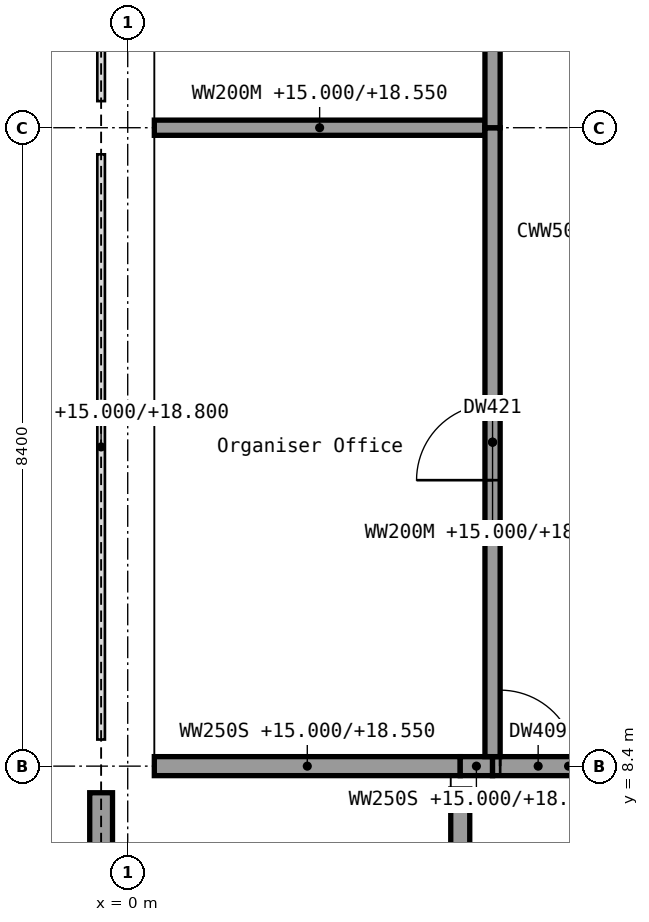
"""IFC4 building model, lengths in metres.
Left out: names, types, materials, properties, quantities, classifications, styles, units other than length and angle.
Written with IfcOpenShell. Run it as: python <this file> out.ifc"""

import sys

from ifc_helpers import new_model, si_unit, direction, frame, frame_2d, origin, origin_2d, place, context, subcontext, project, spatial, rectangle, extrude, element, fill, save


model = new_model("IFC4")
c1 = context("Model", 3, precision=1e-05, world=origin(), true_north=direction((0.0, 1.0)))
c2 = subcontext(c1, "Body", "Model", "MODEL_VIEW")
j1 = project(units=[si_unit("LENGTHUNIT", "METRE"), si_unit("PLANEANGLEUNIT", "RADIAN")], contexts=[c1])
p1 = place(None, origin())
s1 = spatial("IfcSite", under=j1, at=p1, CompositionType="ELEMENT")
p2 = place(p1, origin())
s2 = spatial("IfcBuilding", under=s1, at=p2, CompositionType="ELEMENT")
p3 = place(p2, frame((0.0, 0.0, 15.0)))
s3 = spatial("IfcBuildingStorey", under=s2, at=p3, CompositionType="ELEMENT", Elevation=15.0)
for number, where, z_axis, x_axis in (
    (1, (0.0, 8.4, 0.0), (0.0, 0.0, 1.0), (1.0, 0.0, 0.0)),
    (2, (0.0, 16.8, 0.0), (0.0, 0.0, 1.0), (1.0, 0.0, 0.0)),
):
    element("IfcColumn", number, at=place(p3, frame(where, z_axis=z_axis, x_axis=x_axis)), inside=s3, PredefinedType="COLUMN", context=c2, shape_type="SweptSolid", body=[
        extrude(rectangle(XDim=0.7, YDim=0.7, at=origin_2d()), origin(), (0.0, 0.0, 1.0), 4.5),
    ])
p4 = place(p3, frame((-0.35, 0.35, 0.0), z_axis=(0.0, 0.0, 1.0), x_axis=(0.0, 1.0, 0.0)))
e3 = element("IfcWall", 3, at=p4, inside=s3, PredefinedType="SOLIDWALL", context=c2, shape_type="SweptSolid", body=[
    extrude(rectangle(XDim=7.7, YDim=0.3, at=frame_2d((3.85, 0.0))), origin(), (0.0, 0.0, 1.0), 3.8),
])
p5 = place(p4, frame((3.25, 0.0, 1.0)))
e4 = element("IfcOpeningElement", 4, at=p5, cuts=e3, PredefinedType="OPENING", context=c2, shape_type="SweptSolid", body=[
    extrude(rectangle(XDim=1.2, YDim=1.5, at=frame_2d((0.6, 0.75))), frame((0.0, 0.15, 0.0), z_axis=(0.0, -1.0, 0.0), x_axis=(1.0, 0.0, 0.0)), (0.0, 0.0, 1.0), 0.3),
])
p6 = place(p3, frame((0.35, 8.4, 0.0), z_axis=(0.0, 0.0, 1.0), x_axis=(1.0, 0.0, 0.0)))
e5 = element("IfcWall", 5, at=p6, inside=s3, PredefinedType="SHEAR", context=c2, shape_type="SweptSolid", body=[
    extrude(rectangle(XDim=4.025, YDim=0.25, at=frame_2d((2.012, 0.0))), origin(), (0.0, 0.0, 1.0), 3.55),
])
p7 = place(p3, frame((4.375, 8.4, 0.0), z_axis=(0.0, 0.0, 1.0), x_axis=(1.0, 0.0, 0.0)))
e6 = element("IfcWall", 6, at=p7, inside=s3, PredefinedType="SHEAR", context=c2, shape_type="SweptSolid", body=[
    extrude(rectangle(XDim=0.425, YDim=0.25, at=frame_2d((0.212, 0.0))), origin(), (0.0, 0.0, 1.0), 3.55),
])
p8 = place(p3, frame((4.8, 8.4, 0.0), z_axis=(0.0, 0.0, 1.0), x_axis=(1.0, 0.0, 0.0)))
e7 = element("IfcWall", 7, at=p8, inside=s3, PredefinedType="SHEAR", context=c2, shape_type="SweptSolid", body=[
    extrude(rectangle(XDim=2.0, YDim=0.25, at=frame_2d((1.0, 0.0))), origin(), (0.0, 0.0, 1.0), 3.55),
])
p9 = place(p8, frame((0.1, 0.0, 0.0)))
e8 = element("IfcOpeningElement", 8, at=p9, cuts=e7, PredefinedType="OPENING", context=c2, shape_type="SweptSolid", body=[
    extrude(rectangle(XDim=1.0, YDim=2.1, at=frame_2d((0.5, 1.05))), frame((0.0, 0.125, 0.0), z_axis=(0.0, -1.0, 0.0), x_axis=(1.0, 0.0, 0.0)), (0.0, 0.0, 1.0), 0.25),
])
p10 = place(p3, frame((0.35, 16.8, 0.0), z_axis=(0.0, 0.0, 1.0), x_axis=(1.0, 0.0, 0.0)))
e9 = element("IfcWall", 9, at=p10, inside=s3, PredefinedType="PARTITIONING", context=c2, shape_type="SweptSolid", body=[
    extrude(rectangle(XDim=4.35, YDim=0.2, at=frame_2d((2.175, 0.0))), origin(), (0.0, 0.0, 1.0), 3.55),
])
p11 = place(p3, frame((4.375, 0.35, 0.0), z_axis=(0.0, 0.0, 1.0), x_axis=(0.0, 1.0, 0.0)))
e10 = element("IfcWall", 10, at=p11, inside=s3, PredefinedType="SHEAR", context=c2, shape_type="SweptSolid", body=[
    extrude(rectangle(XDim=7.75, YDim=0.25, at=frame_2d((3.875, 0.0))), origin(), (0.0, 0.0, 1.0), 4.15),
])
p12 = place(p11, frame((0.1, 0.0, 0.0)))
e11 = element("IfcOpeningElement", 11, at=p12, cuts=e10, PredefinedType="OPENING", context=c2, shape_type="SweptSolid", body=[
    extrude(rectangle(XDim=1.1, YDim=2.1, at=frame_2d((0.55, 1.05))), frame((0.0, 0.125, 0.0), z_axis=(0.0, -1.0, 0.0), x_axis=(1.0, 0.0, 0.0)), (0.0, 0.0, 1.0), 0.25),
])
p13 = place(p3, frame((4.8, 8.525, 0.0), z_axis=(0.0, 0.0, 1.0), x_axis=(0.0, 1.0, 0.0)))
e12 = element("IfcWall", 12, at=p13, inside=s3, PredefinedType="PARTITIONING", context=c2, shape_type="SweptSolid", body=[
    extrude(rectangle(XDim=8.275, YDim=0.2, at=frame_2d((4.138, 0.0))), origin(), (0.0, 0.0, 1.0), 3.55),
])
p14 = place(p13, frame((3.637, 0.0, 0.0)))
e13 = element("IfcOpeningElement", 13, at=p14, cuts=e12, PredefinedType="OPENING", context=c2, shape_type="SweptSolid", body=[
    extrude(rectangle(XDim=1.0, YDim=2.1, at=frame_2d((0.5, 1.05))), frame((0.0, 0.1, 0.0), z_axis=(0.0, -1.0, 0.0), x_axis=(1.0, 0.0, 0.0)), (0.0, 0.0, 1.0), 0.2),
])
p15 = place(p3, frame((4.8, 16.8, 0.0), z_axis=(0.0, 0.0, 1.0), x_axis=(0.0, 1.0, 0.0)))
e14 = element("IfcWall", 14, at=p15, inside=s3, PredefinedType="PARTITIONING", context=c2, shape_type="SweptSolid", body=[
    extrude(rectangle(XDim=8.4, YDim=0.2, at=frame_2d((4.2, 0.0))), origin(), (0.0, 0.0, 1.0), 3.55),
])
p16 = place(p15, frame((3.7, 0.0, 0.0)))
e15 = element("IfcOpeningElement", 15, at=p16, cuts=e14, PredefinedType="OPENING", context=c2, shape_type="SweptSolid", body=[
    extrude(rectangle(XDim=1.0, YDim=2.1, at=frame_2d((0.5, 1.05))), frame((0.0, 0.1, 0.0), z_axis=(0.0, -1.0, 0.0), x_axis=(1.0, 0.0, 0.0)), (0.0, 0.0, 1.0), 0.2),
])
p17 = place(p9, origin())
e16 = element("IfcDoor", 16, at=p17, inside=s3, OperationType="SINGLE_SWING_LEFT", PredefinedType="DOOR", context=c2, shape_type="SweptSolid", body=[
    extrude(rectangle(XDim=1.0, YDim=2.1, at=frame_2d((0.5, 1.05))), frame((0.0, 0.025, 0.0), z_axis=(0.0, -1.0, 0.0), x_axis=(1.0, 0.0, 0.0)), (0.0, 0.0, 1.0), 0.05),
])
fill(e8, e16)
p18 = place(p14, origin())
e17 = element("IfcDoor", 17, at=p18, inside=s3, OperationType="SINGLE_SWING_LEFT", PredefinedType="DOOR", context=c2, shape_type="SweptSolid", body=[
    extrude(rectangle(XDim=1.0, YDim=2.1, at=frame_2d((0.5, 1.05))), frame((0.0, 0.025, 0.0), z_axis=(0.0, -1.0, 0.0), x_axis=(1.0, 0.0, 0.0)), (0.0, 0.0, 1.0), 0.05),
])
fill(e13, e17)
save(model, sys.argv[1])
